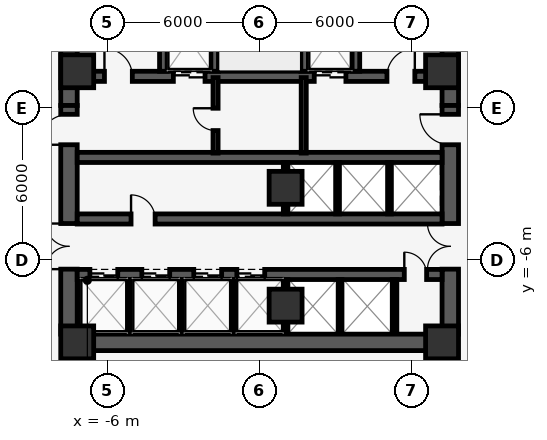
"""IFC4 building model, lengths in metres.
Left out: names, types, materials, properties, quantities, classifications, styles, units other than length and angle.
Written with IfcOpenShell. Run it as: python <this file> out.ifc"""

import sys

from ifc_helpers import new_model, si_unit, direction, frame, frame_2d, origin, origin_2d, place, context, subcontext, project, spatial, rectangle, extrude, element, fill, save


model = new_model("IFC4")
c1 = context("Model", 3, precision=1e-05, world=origin(), true_north=direction((0.0, 1.0)))
c2 = subcontext(c1, "Body", "Model", "MODEL_VIEW")
j1 = project(units=[si_unit("LENGTHUNIT", "METRE"), si_unit("PLANEANGLEUNIT", "RADIAN")], contexts=[c1])
p1 = place(None, origin())
s1 = spatial("IfcSite", under=j1, at=p1, CompositionType="ELEMENT")
p2 = place(p1, origin())
s2 = spatial("IfcBuilding", under=s1, at=p2, CompositionType="ELEMENT")
p3 = place(p2, frame((0.0, 0.0, 181.9)))
s3 = spatial("IfcBuildingStorey", under=s2, at=p3, CompositionType="ELEMENT", Elevation=181.9)
p4 = place(p3, frame((-7.2, 1.25, 0.0), z_axis=(0.0, 0.0, 1.0), x_axis=(1.0, 0.0, 0.0)))
e1 = element("IfcWall", 1, at=p4, inside=s3, PredefinedType="SHEAR", context=c2, shape_type="SweptSolid", body=[
    extrude(rectangle(XDim=14.4, YDim=0.4, at=frame_2d((7.2, 0.0))), origin(), (0.0, 0.0, 1.0), 3.85),
])
p5 = place(p4, frame((3.795, 0.0, 0.0)))
e2 = element("IfcOpeningElement", 2, at=p5, cuts=e1, PredefinedType="OPENING", context=c2, shape_type="SweptSolid", body=[
    extrude(rectangle(XDim=1.25, YDim=2.25, at=frame_2d((0.625, 1.125))), frame((0.0, 0.21, 0.0), z_axis=(0.0, -1.0, 0.0), x_axis=(1.0, 0.0, 0.0)), (0.0, 0.0, 1.0), 0.42),
])
p6 = place(p4, frame((9.355, 0.0, 0.0)))
e3 = element("IfcOpeningElement", 3, at=p6, cuts=e1, PredefinedType="OPENING", context=c2, shape_type="SweptSolid", body=[
    extrude(rectangle(XDim=1.25, YDim=2.25, at=frame_2d((0.625, 1.125))), frame((0.0, 0.21, 0.0), z_axis=(0.0, -1.0, 0.0), x_axis=(1.0, 0.0, 0.0)), (0.0, 0.0, 1.0), 0.42),
])
p7 = place(p4, frame((1.075, 0.0, 0.0)))
e4 = element("IfcOpeningElement", 4, at=p7, cuts=e1, PredefinedType="OPENING", context=c2, shape_type="SweptSolid", body=[
    extrude(rectangle(XDim=1.1, YDim=2.15, at=frame_2d((0.55, 1.075))), frame((0.0, 0.21, 0.0), z_axis=(0.0, -1.0, 0.0), x_axis=(1.0, 0.0, 0.0)), (0.0, 0.0, 1.0), 0.42),
])
p8 = place(p4, frame((12.225, 0.0, 0.0)))
e5 = element("IfcOpeningElement", 5, at=p8, cuts=e1, PredefinedType="OPENING", context=c2, shape_type="SweptSolid", body=[
    extrude(rectangle(XDim=1.1, YDim=2.15, at=frame_2d((0.55, 1.075))), frame((0.0, 0.21, 0.0), z_axis=(0.0, -1.0, 0.0), x_axis=(1.0, 0.0, 0.0)), (0.0, 0.0, 1.0), 0.42),
])
for number, where, z_axis, x_axis in (
    (6, (-3.8, 1.45, 0.0), (0.0, 0.0, 1.0), (0.0, 1.0, 0.0)),
    (7, (-1.775, 1.45, 0.0), (0.0, 0.0, 1.0), (0.0, 1.0, 0.0)),
    (8, (1.775, 1.45, 0.0), (0.0, 0.0, 1.0), (0.0, 1.0, 0.0)),
    (9, (3.8, 1.45, 0.0), (0.0, 0.0, 1.0), (0.0, 1.0, 0.0)),
):
    element("IfcWall", number, at=place(p3, frame(where, z_axis=z_axis, x_axis=x_axis)), inside=s3, PredefinedType="SHEAR", context=c2, shape_type="SweptSolid", body=[
        extrude(rectangle(XDim=7.7, YDim=0.3, at=frame_2d((3.85, 0.0))), origin(), (0.0, 0.0, 1.0), 3.85),
    ])
for number, where, z_axis, x_axis in (
    (10, (-7.525, 0.1, 0.0), (0.0, 0.0, 1.0), (0.0, 1.0, 0.0)),
    (11, (7.525, 0.1, 0.0), (0.0, 0.0, 1.0), (0.0, 1.0, 0.0)),
):
    element("IfcWall", number, at=place(p3, frame(where, z_axis=z_axis, x_axis=x_axis)), inside=s3, PredefinedType="SHEAR", context=c2, shape_type="SweptSolid", body=[
        extrude(rectangle(XDim=9.05, YDim=0.65, at=frame_2d((4.525, 0.0))), origin(), (0.0, 0.0, 1.0), 3.85),
    ])
p9 = place(p3, frame((-7.525, -8.925, 0.0), z_axis=(0.0, 0.0, 1.0), x_axis=(0.0, 1.0, 0.0)))
e12 = element("IfcWall", 12, at=p9, inside=s3, PredefinedType="SHEAR", context=c2, shape_type="SweptSolid", body=[
    extrude(rectangle(XDim=9.025, YDim=0.65, at=frame_2d((4.513, 0.0))), origin(), (0.0, 0.0, 1.0), 3.85),
])
p10 = place(p9, frame((2.565, 0.0, 0.0)))
e13 = element("IfcOpeningElement", 13, at=p10, cuts=e12, PredefinedType="OPENING", context=c2, shape_type="SweptSolid", body=[
    extrude(rectangle(XDim=1.8, YDim=2.2, at=frame_2d((0.9, 1.1))), frame((0.0, 0.335, 0.0), z_axis=(0.0, -1.0, 0.0), x_axis=(1.0, 0.0, 0.0)), (0.0, 0.0, 1.0), 0.67),
])
p11 = place(p9, frame((7.475, 0.0, 0.0)))
e14 = element("IfcOpeningElement", 14, at=p11, cuts=e12, PredefinedType="OPENING", context=c2, shape_type="SweptSolid", body=[
    extrude(rectangle(XDim=1.2, YDim=2.15, at=frame_2d((0.6, 1.075))), frame((0.0, 0.335, 0.0), z_axis=(0.0, -1.0, 0.0), x_axis=(1.0, 0.0, 0.0)), (0.0, 0.0, 1.0), 0.67),
])
p12 = place(p3, frame((7.525, -8.925, 0.0), z_axis=(0.0, 0.0, 1.0), x_axis=(0.0, 1.0, 0.0)))
e15 = element("IfcWall", 15, at=p12, inside=s3, PredefinedType="SHEAR", context=c2, shape_type="SweptSolid", body=[
    extrude(rectangle(XDim=9.025, YDim=0.65, at=frame_2d((4.513, 0.0))), origin(), (0.0, 0.0, 1.0), 3.85),
])
p13 = place(p12, frame((2.565, 0.0, 0.0)))
e16 = element("IfcOpeningElement", 16, at=p13, cuts=e15, PredefinedType="OPENING", context=c2, shape_type="SweptSolid", body=[
    extrude(rectangle(XDim=1.8, YDim=2.2, at=frame_2d((0.9, 1.1))), frame((0.0, 0.335, 0.0), z_axis=(0.0, -1.0, 0.0), x_axis=(1.0, 0.0, 0.0)), (0.0, 0.0, 1.0), 0.67),
])
p14 = place(p12, frame((7.475, 0.0, 0.0)))
e17 = element("IfcOpeningElement", 17, at=p14, cuts=e15, PredefinedType="OPENING", context=c2, shape_type="SweptSolid", body=[
    extrude(rectangle(XDim=1.2, YDim=2.15, at=frame_2d((0.6, 1.075))), frame((0.0, 0.335, 0.0), z_axis=(0.0, -1.0, 0.0), x_axis=(1.0, 0.0, 0.0)), (0.0, 0.0, 1.0), 0.67),
])
p15 = place(p3, frame((-7.525, -9.25, 0.0), z_axis=(0.0, 0.0, 1.0), x_axis=(1.0, 0.0, 0.0)))
e18 = element("IfcWall", 18, at=p15, inside=s3, PredefinedType="SHEAR", context=c2, shape_type="SweptSolid", body=[
    extrude(rectangle(XDim=15.05, YDim=0.65, at=frame_2d((7.525, 0.0))), origin(), (0.0, 0.0, 1.0), 3.85),
])
p16 = place(p3, frame((-7.2, -1.95, 0.0), z_axis=(0.0, 0.0, 1.0), x_axis=(1.0, 0.0, 0.0)))
e19 = element("IfcWall", 19, at=p16, inside=s3, PredefinedType="SHEAR", context=c2, shape_type="SweptSolid", body=[
    extrude(rectangle(XDim=14.4, YDim=0.4, at=frame_2d((7.2, 0.0))), origin(), (0.0, 0.0, 1.0), 3.85),
])
p17 = place(p3, frame((-7.2, -4.38, 0.0), z_axis=(0.0, 0.0, 1.0), x_axis=(1.0, 0.0, 0.0)))
e20 = element("IfcWall", 20, at=p17, inside=s3, PredefinedType="SHEAR", context=c2, shape_type="SweptSolid", body=[
    extrude(rectangle(XDim=14.4, YDim=0.4, at=frame_2d((7.2, 0.0))), origin(), (0.0, 0.0, 1.0), 3.85),
])
p18 = place(p17, frame((2.125, 0.0, 0.0)))
e21 = element("IfcOpeningElement", 21, at=p18, cuts=e20, PredefinedType="OPENING", context=c2, shape_type="SweptSolid", body=[
    extrude(rectangle(XDim=0.95, YDim=2.15, at=frame_2d((0.475, 1.075))), frame((0.0, 0.21, 0.0), z_axis=(0.0, -1.0, 0.0), x_axis=(1.0, 0.0, 0.0)), (0.0, 0.0, 1.0), 0.42),
])
p19 = place(p3, frame((-7.2, -6.57, 0.0), z_axis=(0.0, 0.0, 1.0), x_axis=(1.0, 0.0, 0.0)))
e22 = element("IfcWall", 22, at=p19, inside=s3, PredefinedType="SHEAR", context=c2, shape_type="SweptSolid", body=[
    extrude(rectangle(XDim=14.4, YDim=0.4, at=frame_2d((7.2, 0.0))), origin(), (0.0, 0.0, 1.0), 3.85),
])
p20 = place(p19, frame((0.5, 0.0, 0.0)))
e23 = element("IfcOpeningElement", 23, at=p20, cuts=e22, PredefinedType="OPENING", context=c2, shape_type="SweptSolid", body=[
    extrude(rectangle(XDim=1.1, YDim=2.2, at=frame_2d((0.55, 1.1))), frame((0.0, 0.21, 0.0), z_axis=(0.0, -1.0, 0.0), x_axis=(1.0, 0.0, 0.0)), (0.0, 0.0, 1.0), 0.42),
])
p21 = place(p19, frame((2.55, 0.0, 0.0)))
e24 = element("IfcOpeningElement", 24, at=p21, cuts=e22, PredefinedType="OPENING", context=c2, shape_type="SweptSolid", body=[
    extrude(rectangle(XDim=1.1, YDim=2.2, at=frame_2d((0.55, 1.1))), frame((0.0, 0.21, 0.0), z_axis=(0.0, -1.0, 0.0), x_axis=(1.0, 0.0, 0.0)), (0.0, 0.0, 1.0), 0.42),
])
p22 = place(p19, frame((4.6, 0.0, 0.0)))
e25 = element("IfcOpeningElement", 25, at=p22, cuts=e22, PredefinedType="OPENING", context=c2, shape_type="SweptSolid", body=[
    extrude(rectangle(XDim=1.1, YDim=2.2, at=frame_2d((0.55, 1.1))), frame((0.0, 0.21, 0.0), z_axis=(0.0, -1.0, 0.0), x_axis=(1.0, 0.0, 0.0)), (0.0, 0.0, 1.0), 0.42),
])
p23 = place(p19, frame((6.3, 0.0, 0.0)))
e26 = element("IfcOpeningElement", 26, at=p23, cuts=e22, PredefinedType="OPENING", context=c2, shape_type="SweptSolid", body=[
    extrude(rectangle(XDim=1.1, YDim=2.2, at=frame_2d((0.55, 1.1))), frame((0.0, 0.21, 0.0), z_axis=(0.0, -1.0, 0.0), x_axis=(1.0, 0.0, 0.0)), (0.0, 0.0, 1.0), 0.42),
])
p24 = place(p19, frame((12.91, 0.0, 0.0)))
e27 = element("IfcOpeningElement", 27, at=p24, cuts=e22, PredefinedType="OPENING", context=c2, shape_type="SweptSolid", body=[
    extrude(rectangle(XDim=0.88, YDim=2.15, at=frame_2d((0.44, 1.075))), frame((0.0, 0.21, 0.0), z_axis=(0.0, -1.0, 0.0), x_axis=(1.0, 0.0, 0.0)), (0.0, 0.0, 1.0), 0.42),
])
for number, where, z_axis, x_axis in (
    (28, (-7.2, -9.25, 0.0), (0.0, 0.0, 1.0), (1.0, 0.0, 0.0)),
    (29, (7.2, -9.25, 0.0), (0.0, 0.0, 1.0), (1.0, 0.0, 0.0)),
    (30, (7.2, 1.45, 0.0), (0.0, 0.0, 1.0), (1.0, 0.0, 0.0)),
    (31, (-7.2, 1.45, 0.0), (0.0, 0.0, 1.0), (1.0, 0.0, 0.0)),
    (32, (1.025, -3.15, 0.0), (0.0, 0.0, 1.0), (1.0, 0.0, 0.0)),
    (33, (1.025, -7.8, 0.0), (0.0, 0.0, 1.0), (1.0, 0.0, 0.0)),
):
    element("IfcColumn", number, at=place(p3, frame(where, z_axis=z_axis, x_axis=x_axis)), inside=s3, PredefinedType="COLUMN", context=c2, shape_type="SweptSolid", body=[
        extrude(rectangle(XDim=1.3, YDim=1.3, at=origin_2d()), origin(), (0.0, 0.0, 1.0), 4.1),
    ])
p25 = place(p3, frame((34.398, -5.217, 0.0), z_axis=(0.0, 0.0, 1.0), x_axis=(-0.88294811928, -0.469470572731, 0.0)))
e34 = element("IfcWall", 34, at=p25, inside=s3, PredefinedType="STANDARD", context=c2, shape_type="SweptSolid", body=[
    extrude(rectangle(XDim=55.845, YDim=0.3, at=frame_2d((27.923, 0.0))), origin(), (0.0, 0.0, 1.0), 3.85),
])
p26 = place(p25, frame((27.423, 0.0, 0.0)))
e35 = element("IfcOpeningElement", 35, at=p26, cuts=e34, PredefinedType="OPENING", context=c2, shape_type="SweptSolid", body=[
    extrude(rectangle(XDim=1.0, YDim=2.15, at=frame_2d((0.5, 1.075))), frame((0.0, 0.16, 0.0), z_axis=(0.0, -1.0, 0.0), x_axis=(1.0, 0.0, 0.0)), (0.0, 0.0, 1.0), 0.32),
])
p27 = place(p25, frame((4.823, 0.0, 0.85)))
e36 = element("IfcOpeningElement", 36, at=p27, cuts=e34, PredefinedType="OPENING", context=c2, shape_type="SweptSolid", body=[
    extrude(rectangle(XDim=1.4, YDim=2.2, at=frame_2d((0.7, 1.1))), frame((0.0, 0.16, 0.0), z_axis=(0.0, -1.0, 0.0), x_axis=(1.0, 0.0, 0.0)), (0.0, 0.0, 1.0), 0.32),
])
p28 = place(p25, frame((10.423, 0.0, 0.85)))
e37 = element("IfcOpeningElement", 37, at=p28, cuts=e34, PredefinedType="OPENING", context=c2, shape_type="SweptSolid", body=[
    extrude(rectangle(XDim=1.4, YDim=2.2, at=frame_2d((0.7, 1.1))), frame((0.0, 0.16, 0.0), z_axis=(0.0, -1.0, 0.0), x_axis=(1.0, 0.0, 0.0)), (0.0, 0.0, 1.0), 0.32),
])
p29 = place(p25, frame((21.623, 0.0, 0.85)))
e38 = element("IfcOpeningElement", 38, at=p29, cuts=e34, PredefinedType="OPENING", context=c2, shape_type="SweptSolid", body=[
    extrude(rectangle(XDim=1.4, YDim=2.2, at=frame_2d((0.7, 1.1))), frame((0.0, 0.16, 0.0), z_axis=(0.0, -1.0, 0.0), x_axis=(1.0, 0.0, 0.0)), (0.0, 0.0, 1.0), 0.32),
])
p30 = place(p25, frame((32.823, 0.0, 0.85)))
e39 = element("IfcOpeningElement", 39, at=p30, cuts=e34, PredefinedType="OPENING", context=c2, shape_type="SweptSolid", body=[
    extrude(rectangle(XDim=1.4, YDim=2.2, at=frame_2d((0.7, 1.1))), frame((0.0, 0.16, 0.0), z_axis=(0.0, -1.0, 0.0), x_axis=(1.0, 0.0, 0.0)), (0.0, 0.0, 1.0), 0.32),
])
p31 = place(p25, frame((38.423, 0.0, 0.85)))
e40 = element("IfcOpeningElement", 40, at=p31, cuts=e34, PredefinedType="OPENING", context=c2, shape_type="SweptSolid", body=[
    extrude(rectangle(XDim=1.4, YDim=2.2, at=frame_2d((0.7, 1.1))), frame((0.0, 0.16, 0.0), z_axis=(0.0, -1.0, 0.0), x_axis=(1.0, 0.0, 0.0)), (0.0, 0.0, 1.0), 0.32),
])
p32 = place(p25, frame((44.023, 0.0, 0.85)))
e41 = element("IfcOpeningElement", 41, at=p32, cuts=e34, PredefinedType="OPENING", context=c2, shape_type="SweptSolid", body=[
    extrude(rectangle(XDim=1.4, YDim=2.2, at=frame_2d((0.7, 1.1))), frame((0.0, 0.16, 0.0), z_axis=(0.0, -1.0, 0.0), x_axis=(1.0, 0.0, 0.0)), (0.0, 0.0, 1.0), 0.32),
])
p33 = place(p25, frame((49.623, 0.0, 0.85)))
e42 = element("IfcOpeningElement", 42, at=p33, cuts=e34, PredefinedType="OPENING", context=c2, shape_type="SweptSolid", body=[
    extrude(rectangle(XDim=1.4, YDim=2.2, at=frame_2d((0.7, 1.1))), frame((0.0, 0.16, 0.0), z_axis=(0.0, -1.0, 0.0), x_axis=(1.0, 0.0, 0.0)), (0.0, 0.0, 1.0), 0.32),
])
p34 = place(p3, frame((1.025, -4.18, 0.0), z_axis=(0.0, 0.0, 1.0), x_axis=(0.0, 1.0, 0.0)))
e43 = element("IfcWall", 43, at=p34, inside=s3, PredefinedType="PARTITIONING", context=c2, shape_type="SweptSolid", body=[
    extrude(rectangle(XDim=2.03, YDim=0.18, at=frame_2d((1.015, 0.0))), origin(), (0.0, 0.0, 1.0), 2.898),
])
for number, where, z_axis, x_axis in (
    (44, (3.075, -4.18, 0.0), (0.0, 0.0, 1.0), (0.0, 1.0, 0.0)),
    (45, (5.125, -4.18, 0.0), (0.0, 0.0, 1.0), (0.0, 1.0, 0.0)),
):
    element("IfcWall", number, at=place(p3, frame(where, z_axis=z_axis, x_axis=x_axis)), inside=s3, PredefinedType="PARTITIONING", context=c2, shape_type="SweptSolid", body=[
        extrude(rectangle(XDim=2.03, YDim=0.15, at=frame_2d((1.015, 0.0))), origin(), (0.0, 0.0, 1.0), 3.85),
    ])
for number, where, z_axis, x_axis in (
    (46, (-5.125, -8.85, 0.0), (0.0, 0.0, 1.0), (0.0, 1.0, 0.0)),
    (47, (-3.075, -8.85, 0.0), (0.0, 0.0, 1.0), (0.0, 1.0, 0.0)),
    (48, (-1.025, -8.85, 0.0), (0.0, 0.0, 1.0), (0.0, 1.0, 0.0)),
):
    element("IfcWall", number, at=place(p3, frame(where, z_axis=z_axis, x_axis=x_axis)), inside=s3, PredefinedType="PARTITIONING", context=c2, shape_type="SweptSolid", body=[
        extrude(rectangle(XDim=2.08, YDim=0.15, at=frame_2d((1.04, 0.0))), origin(), (0.0, 0.0, 1.0), 3.85),
    ])
p35 = place(p3, frame((1.025, -8.85, 0.0), z_axis=(0.0, 0.0, 1.0), x_axis=(0.0, 1.0, 0.0)))
e49 = element("IfcWall", 49, at=p35, inside=s3, PredefinedType="PARTITIONING", context=c2, shape_type="SweptSolid", body=[
    extrude(rectangle(XDim=2.08, YDim=0.18, at=frame_2d((1.04, 0.0))), origin(), (0.0, 0.0, 1.0), 2.898),
])
p36 = place(p3, frame((3.175, -8.85, 0.0), z_axis=(0.0, 0.0, 1.0), x_axis=(0.0, 1.0, 0.0)))
e50 = element("IfcWall", 50, at=p36, inside=s3, PredefinedType="PARTITIONING", context=c2, shape_type="SweptSolid", body=[
    extrude(rectangle(XDim=2.08, YDim=0.15, at=frame_2d((1.04, 0.0))), origin(), (0.0, 0.0, 1.0), 3.85),
])
p37 = place(p3, frame((5.325, -8.85, 0.0), z_axis=(0.0, 0.0, 1.0), x_axis=(0.0, 1.0, 0.0)))
e51 = element("IfcWall", 51, at=p37, inside=s3, PredefinedType="PARTITIONING", context=c2, shape_type="SweptSolid", body=[
    extrude(rectangle(XDim=2.08, YDim=0.18, at=frame_2d((1.04, 0.0))), origin(), (0.0, 0.0, 1.0), 3.85),
])
p38 = place(p3, frame((-1.74, -1.78, 0.0), z_axis=(0.0, 0.0, 1.0), x_axis=(0.0, 1.0, 0.0)))
e52 = element("IfcWall", 52, at=p38, inside=s3, PredefinedType="PARTITIONING", context=c2, shape_type="SweptSolid", body=[
    extrude(rectangle(XDim=2.98, YDim=0.2, at=frame_2d((1.49, 0.0))), origin(), (0.0, 0.0, 1.0), 3.85),
])
p39 = place(p38, frame((0.89, 0.0, 0.0)))
e53 = element("IfcOpeningElement", 53, at=p39, cuts=e52, PredefinedType="OPENING", context=c2, shape_type="SweptSolid", body=[
    extrude(rectangle(XDim=0.88, YDim=2.15, at=frame_2d((0.44, 1.075))), frame((0.0, 0.11, 0.0), z_axis=(0.0, -1.0, 0.0), x_axis=(1.0, 0.0, 0.0)), (0.0, 0.0, 1.0), 0.22),
])
p40 = place(p3, frame((1.74, -1.78, 0.0), z_axis=(0.0, 0.0, 1.0), x_axis=(0.0, 1.0, 0.0)))
e54 = element("IfcWall", 54, at=p40, inside=s3, PredefinedType="PARTITIONING", context=c2, shape_type="SweptSolid", body=[
    extrude(rectangle(XDim=2.98, YDim=0.2, at=frame_2d((1.49, 0.0))), origin(), (0.0, 0.0, 1.0), 3.85),
])
p41 = place(p20, origin())
e55 = element("IfcDoor", 55, at=p41, inside=s3, OperationType="DOUBLE_DOOR_SLIDING", PredefinedType="DOOR", context=c2, shape_type="SweptSolid", body=[
    extrude(rectangle(XDim=1.1, YDim=2.2, at=frame_2d((0.55, 1.1))), frame((0.0, 0.025, 0.0), z_axis=(0.0, -1.0, 0.0), x_axis=(1.0, 0.0, 0.0)), (0.0, 0.0, 1.0), 0.05),
])
fill(e23, e55)
p42 = place(p21, origin())
e56 = element("IfcDoor", 56, at=p42, inside=s3, OperationType="DOUBLE_DOOR_SLIDING", PredefinedType="DOOR", context=c2, shape_type="SweptSolid", body=[
    extrude(rectangle(XDim=1.1, YDim=2.2, at=frame_2d((0.55, 1.1))), frame((0.0, 0.025, 0.0), z_axis=(0.0, -1.0, 0.0), x_axis=(1.0, 0.0, 0.0)), (0.0, 0.0, 1.0), 0.05),
])
fill(e24, e56)
p43 = place(p22, origin())
e57 = element("IfcDoor", 57, at=p43, inside=s3, OperationType="DOUBLE_DOOR_SLIDING", PredefinedType="DOOR", context=c2, shape_type="SweptSolid", body=[
    extrude(rectangle(XDim=1.1, YDim=2.2, at=frame_2d((0.55, 1.1))), frame((0.0, 0.025, 0.0), z_axis=(0.0, -1.0, 0.0), x_axis=(1.0, 0.0, 0.0)), (0.0, 0.0, 1.0), 0.05),
])
fill(e25, e57)
p44 = place(p23, origin())
e58 = element("IfcDoor", 58, at=p44, inside=s3, OperationType="DOUBLE_DOOR_SLIDING", PredefinedType="DOOR", context=c2, shape_type="SweptSolid", body=[
    extrude(rectangle(XDim=1.1, YDim=2.2, at=frame_2d((0.55, 1.1))), frame((0.0, 0.025, 0.0), z_axis=(0.0, -1.0, 0.0), x_axis=(1.0, 0.0, 0.0)), (0.0, 0.0, 1.0), 0.05),
])
fill(e26, e58)
p45 = place(p5, origin())
e59 = element("IfcDoor", 59, at=p45, inside=s3, OperationType="DOUBLE_DOOR_SLIDING", PredefinedType="DOOR", context=c2, shape_type="SweptSolid", body=[
    extrude(rectangle(XDim=1.25, YDim=2.25, at=frame_2d((0.625, 1.125))), frame((0.0, 0.025, 0.0), z_axis=(0.0, -1.0, 0.0), x_axis=(1.0, 0.0, 0.0)), (0.0, 0.0, 1.0), 0.05),
])
fill(e2, e59)
p46 = place(p6, origin())
e60 = element("IfcDoor", 60, at=p46, inside=s3, OperationType="DOUBLE_DOOR_SLIDING", PredefinedType="DOOR", context=c2, shape_type="SweptSolid", body=[
    extrude(rectangle(XDim=1.25, YDim=2.25, at=frame_2d((0.625, 1.125))), frame((0.0, 0.025, 0.0), z_axis=(0.0, -1.0, 0.0), x_axis=(1.0, 0.0, 0.0)), (0.0, 0.0, 1.0), 0.05),
])
fill(e3, e60)
p47 = place(p7, origin())
e61 = element("IfcDoor", 61, at=p47, inside=s3, OperationType="SINGLE_SWING_LEFT", PredefinedType="DOOR", context=c2, shape_type="SweptSolid", body=[
    extrude(rectangle(XDim=1.1, YDim=2.15, at=frame_2d((0.55, 1.075))), frame((0.0, 0.025, 0.0), z_axis=(0.0, -1.0, 0.0), x_axis=(1.0, 0.0, 0.0)), (0.0, 0.0, 1.0), 0.05),
])
fill(e4, e61)
p48 = place(p8, origin())
e62 = element("IfcDoor", 62, at=p48, inside=s3, OperationType="SINGLE_SWING_RIGHT", PredefinedType="DOOR", context=c2, shape_type="SweptSolid", body=[
    extrude(rectangle(XDim=1.1, YDim=2.15, at=frame_2d((0.55, 1.075))), frame((0.0, 0.025, 0.0), z_axis=(0.0, -1.0, 0.0), x_axis=(1.0, 0.0, 0.0)), (0.0, 0.0, 1.0), 0.05),
])
fill(e5, e62)
p49 = place(p10, origin())
e63 = element("IfcDoor", 63, at=p49, inside=s3, OperationType="DOUBLE_DOOR_SINGLE_SWING", PredefinedType="DOOR", context=c2, shape_type="SweptSolid", body=[
    extrude(rectangle(XDim=1.8, YDim=2.2, at=frame_2d((0.9, 1.1))), frame((0.0, 0.025, 0.0), z_axis=(0.0, -1.0, 0.0), x_axis=(1.0, 0.0, 0.0)), (0.0, 0.0, 1.0), 0.05),
])
fill(e13, e63)
p50 = place(p11, origin())
e64 = element("IfcDoor", 64, at=p50, inside=s3, OperationType="SINGLE_SWING_LEFT", PredefinedType="DOOR", context=c2, shape_type="SweptSolid", body=[
    extrude(rectangle(XDim=1.2, YDim=2.15, at=frame_2d((0.6, 1.075))), frame((0.0, 0.025, 0.0), z_axis=(0.0, -1.0, 0.0), x_axis=(1.0, 0.0, 0.0)), (0.0, 0.0, 1.0), 0.05),
])
fill(e14, e64)
p51 = place(p13, origin())
e65 = element("IfcDoor", 65, at=p51, inside=s3, OperationType="DOUBLE_DOOR_SINGLE_SWING", PredefinedType="DOOR", context=c2, shape_type="SweptSolid", body=[
    extrude(rectangle(XDim=1.8, YDim=2.2, at=frame_2d((0.9, 1.1))), frame((0.0, 0.025, 0.0), z_axis=(0.0, -1.0, 0.0), x_axis=(1.0, 0.0, 0.0)), (0.0, 0.0, 1.0), 0.05),
])
fill(e16, e65)
p52 = place(p14, origin())
e66 = element("IfcDoor", 66, at=p52, inside=s3, OperationType="SINGLE_SWING_RIGHT", PredefinedType="DOOR", context=c2, shape_type="SweptSolid", body=[
    extrude(rectangle(XDim=1.2, YDim=2.15, at=frame_2d((0.6, 1.075))), frame((0.0, 0.025, 0.0), z_axis=(0.0, -1.0, 0.0), x_axis=(1.0, 0.0, 0.0)), (0.0, 0.0, 1.0), 0.05),
])
fill(e17, e66)
p53 = place(p18, origin())
e67 = element("IfcDoor", 67, at=p53, inside=s3, OperationType="SINGLE_SWING_LEFT", PredefinedType="DOOR", context=c2, shape_type="SweptSolid", body=[
    extrude(rectangle(XDim=0.95, YDim=2.15, at=frame_2d((0.475, 1.075))), frame((0.0, 0.025, 0.0), z_axis=(0.0, -1.0, 0.0), x_axis=(1.0, 0.0, 0.0)), (0.0, 0.0, 1.0), 0.05),
])
fill(e21, e67)
p54 = place(p24, origin())
e68 = element("IfcDoor", 68, at=p54, inside=s3, OperationType="SINGLE_SWING_LEFT", PredefinedType="DOOR", context=c2, shape_type="SweptSolid", body=[
    extrude(rectangle(XDim=0.88, YDim=2.15, at=frame_2d((0.44, 1.075))), frame((0.0, 0.025, 0.0), z_axis=(0.0, -1.0, 0.0), x_axis=(1.0, 0.0, 0.0)), (0.0, 0.0, 1.0), 0.05),
])
fill(e27, e68)
p55 = place(p39, origin())
e69 = element("IfcDoor", 69, at=p55, inside=s3, OperationType="SINGLE_SWING_RIGHT", PredefinedType="DOOR", context=c2, shape_type="SweptSolid", body=[
    extrude(rectangle(XDim=0.88, YDim=2.15, at=frame_2d((0.44, 1.075))), frame((0.0, 0.025, 0.0), z_axis=(0.0, -1.0, 0.0), x_axis=(1.0, 0.0, 0.0)), (0.0, 0.0, 1.0), 0.05),
])
fill(e53, e69)
save(model, sys.argv[1])
